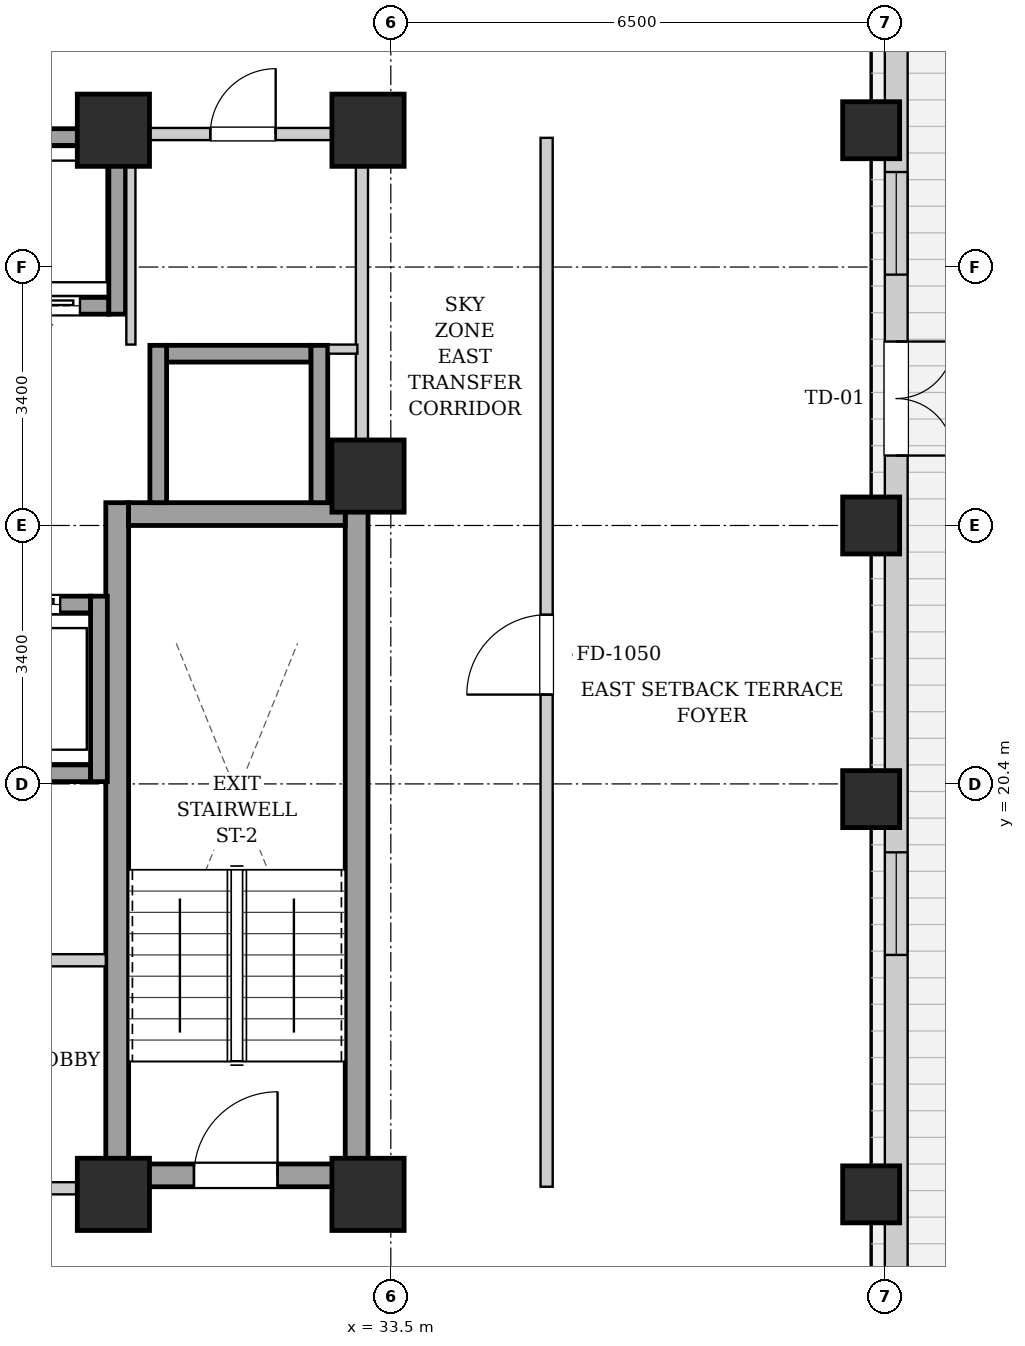
"""IFC4 building model, lengths in metres.
Left out: names, types, materials, properties, quantities, classifications, styles, units other than length and angle.
Written with IfcOpenShell. Run it as: python <this file> out.ifc"""

import sys

from ifc_helpers import new_model, si_unit, direction, frame, frame_2d, origin, origin_2d, place, context, subcontext, project, spatial, rectangle, extrude, element, fill, save


model = new_model("IFC4")
c1 = context("Model", 3, precision=1e-05, world=origin(), true_north=direction((0.0, 1.0)))
c2 = subcontext(c1, "Body", "Model", "MODEL_VIEW")
j1 = project(units=[si_unit("LENGTHUNIT", "METRE"), si_unit("PLANEANGLEUNIT", "RADIAN")], contexts=[c1])
p1 = place(None, origin())
s1 = spatial("IfcSite", under=j1, at=p1, CompositionType="ELEMENT")
p2 = place(p1, origin())
s2 = spatial("IfcBuilding", under=s1, at=p2, CompositionType="ELEMENT")
p3 = place(p2, frame((0.0, 0.0, 124.4)))
s3 = spatial("IfcBuildingStorey", under=s2, at=p3, CompositionType="ELEMENT", Elevation=124.4)
for number, where, z_axis, x_axis in (
    (1, (39.82, 15.0, 0.0), (0.0, 0.0, 1.0), (1.0, 0.0, 0.0)),
    (2, (39.82, 20.2, 0.0), (0.0, 0.0, 1.0), (1.0, 0.0, 0.0)),
    (3, (39.82, 23.8, 0.0), (0.0, 0.0, 1.0), (1.0, 0.0, 0.0)),
    (4, (39.82, 29.0, 0.0), (0.0, 0.0, 1.0), (1.0, 0.0, 0.0)),
):
    element("IfcColumn", number, at=place(p3, frame(where, z_axis=z_axis, x_axis=x_axis)), inside=s3, PredefinedType="COLUMN", context=c2, shape_type="SweptSolid", body=[
        extrude(rectangle(XDim=0.75, YDim=0.75, at=origin_2d()), origin(), (0.0, 0.0, 1.0), 3.25),
    ])
for number, where, z_axis, x_axis in (
    (5, (29.85, 15.0, 0.0), (0.0, 0.0, 1.0), (1.0, 0.0, 0.0)),
    (6, (33.2, 15.0, 0.0), (0.0, 0.0, 1.0), (1.0, 0.0, 0.0)),
    (7, (29.85, 29.0, 0.0), (0.0, 0.0, 1.0), (1.0, 0.0, 0.0)),
    (8, (33.2, 29.0, 0.0), (0.0, 0.0, 1.0), (1.0, 0.0, 0.0)),
    (9, (33.2, 24.45, 0.0), (0.0, 0.0, 1.0), (1.0, 0.0, 0.0)),
):
    element("IfcColumn", number, at=place(p3, frame(where, z_axis=z_axis, x_axis=x_axis)), inside=s3, PredefinedType="COLUMN", context=c2, shape_type="SweptSolid", body=[
        extrude(rectangle(XDim=0.95, YDim=0.95, at=origin_2d()), origin(), (0.0, 0.0, 1.0), 3.25),
    ])
p4 = place(p3, frame((40.15, 40.8, 0.0), z_axis=(0.0, 0.0, 1.0), x_axis=(0.0, -1.0, 0.0)))
e10 = element("IfcWall", 10, at=p4, inside=s3, PredefinedType="SOLIDWALL", context=c2, shape_type="SweptSolid", body=[
    extrude(rectangle(XDim=34.5, YDim=0.3, at=frame_2d((17.25, 0.0))), origin(), (0.0, 0.0, 1.0), 2.99),
])
p5 = place(p4, frame((14.58, 0.0, 0.0)))
e11 = element("IfcOpeningElement", 11, at=p5, cuts=e10, PredefinedType="OPENING", context=c2, shape_type="SweptSolid", body=[
    extrude(rectangle(XDim=1.5, YDim=1.982, at=frame_2d((0.75, 0.991))), frame((0.0, 0.16, 0.0), z_axis=(0.0, -1.0, 0.0), x_axis=(1.0, 0.0, 0.0)), (0.0, 0.0, 1.0), 0.32),
])
p6 = place(p4, frame((21.3, 0.0, 0.55)))
e12 = element("IfcOpeningElement", 12, at=p6, cuts=e10, PredefinedType="OPENING", context=c2, shape_type="SweptSolid", body=[
    extrude(rectangle(XDim=1.35, YDim=1.2, at=frame_2d((0.675, 0.6))), frame((0.0, 0.16, 0.0), z_axis=(0.0, -1.0, 0.0), x_axis=(1.0, 0.0, 0.0)), (0.0, 0.0, 1.0), 0.32),
])
p7 = place(p4, frame((12.35, 0.0, 0.55)))
e13 = element("IfcOpeningElement", 13, at=p7, cuts=e10, PredefinedType="OPENING", context=c2, shape_type="SweptSolid", body=[
    extrude(rectangle(XDim=1.35, YDim=1.2, at=frame_2d((0.675, 0.6))), frame((0.0, 0.16, 0.0), z_axis=(0.0, -1.0, 0.0), x_axis=(1.0, 0.0, 0.0)), (0.0, 0.0, 1.0), 0.32),
])
for number, where, z_axis, x_axis in (
    (14, (29.9, 15.1, 0.0), (0.0, 0.0, 1.0), (0.0, 1.0, 0.0)),
    (15, (33.05, 15.1, 0.0), (0.0, 0.0, 1.0), (0.0, 1.0, 0.0)),
):
    element("IfcWall", number, at=place(p3, frame(where, z_axis=z_axis, x_axis=x_axis)), inside=s3, PredefinedType="SHEAR", context=c2, shape_type="SweptSolid", body=[
        extrude(rectangle(XDim=9.0, YDim=0.3, at=frame_2d((4.5, 0.0))), origin(), (0.0, 0.0, 1.0), 2.99),
    ])
p8 = place(p3, frame((30.05, 23.95, 0.0), z_axis=(0.0, 0.0, 1.0), x_axis=(1.0, 0.0, 0.0)))
e16 = element("IfcWall", 16, at=p8, inside=s3, PredefinedType="SHEAR", context=c2, shape_type="SweptSolid", body=[
    extrude(rectangle(XDim=2.85, YDim=0.3, at=frame_2d((1.425, 0.0))), origin(), (0.0, 0.0, 1.0), 2.99),
])
p9 = place(p3, frame((30.05, 15.25, 0.0), z_axis=(0.0, 0.0, 1.0), x_axis=(1.0, 0.0, 0.0)))
e17 = element("IfcWall", 17, at=p9, inside=s3, PredefinedType="SHEAR", context=c2, shape_type="SweptSolid", body=[
    extrude(rectangle(XDim=2.85, YDim=0.3, at=frame_2d((1.425, 0.0))), origin(), (0.0, 0.0, 1.0), 2.99),
])
p10 = place(p9, frame((0.86, 0.0, 0.0)))
e18 = element("IfcOpeningElement", 18, at=p10, cuts=e17, PredefinedType="OPENING", context=c2, shape_type="SweptSolid", body=[
    extrude(rectangle(XDim=1.1, YDim=2.05, at=frame_2d((0.55, 1.025))), frame((0.0, 0.16, 0.0), z_axis=(0.0, -1.0, 0.0), x_axis=(1.0, 0.0, 0.0)), (0.0, 0.0, 1.0), 0.32),
])
p11 = place(p3, frame((27.93, 26.69, 0.0), z_axis=(0.0, 0.0, 1.0), x_axis=(1.0, 0.0, 0.0)))
e19 = element("IfcWall", 19, at=p11, inside=s3, PredefinedType="SHEAR", context=c2, shape_type="SweptSolid", body=[
    extrude(rectangle(XDim=1.86, YDim=0.22, at=frame_2d((0.93, 0.0))), origin(), (0.0, 0.0, 1.0), 2.99),
])
p12 = place(p11, frame((0.38, 0.0, 0.0)))
e20 = element("IfcOpeningElement", 20, at=p12, cuts=e19, PredefinedType="OPENING", context=c2, shape_type="SweptSolid", body=[
    extrude(rectangle(XDim=1.1, YDim=2.15, at=frame_2d((0.55, 1.075))), frame((0.0, 0.12, 0.0), z_axis=(0.0, -1.0, 0.0), x_axis=(1.0, 0.0, 0.0)), (0.0, 0.0, 1.0), 0.24),
])
p13 = place(p3, frame((27.93, 28.91, 0.0), z_axis=(0.0, 0.0, 1.0), x_axis=(1.0, 0.0, 0.0)))
e21 = element("IfcWall", 21, at=p13, inside=s3, PredefinedType="SHEAR", context=c2, shape_type="SweptSolid", body=[
    extrude(rectangle(XDim=1.86, YDim=0.22, at=frame_2d((0.93, 0.0))), origin(), (0.0, 0.0, 1.0), 2.99),
])
p14 = place(p3, frame((29.9, 26.58, 0.0), z_axis=(0.0, 0.0, 1.0), x_axis=(0.0, 1.0, 0.0)))
e22 = element("IfcWall", 22, at=p14, inside=s3, PredefinedType="SHEAR", context=c2, shape_type="SweptSolid", body=[
    extrude(rectangle(XDim=2.44, YDim=0.22, at=frame_2d((1.22, 0.0))), origin(), (0.0, 0.0, 1.0), 2.99),
])
p15 = place(p3, frame((27.65, 20.54, 0.0), z_axis=(0.0, 0.0, 1.0), x_axis=(1.0, 0.0, 0.0)))
e23 = element("IfcWall", 23, at=p15, inside=s3, PredefinedType="SHEAR", context=c2, shape_type="SweptSolid", body=[
    extrude(rectangle(XDim=1.9, YDim=0.22, at=frame_2d((0.95, 0.0))), origin(), (0.0, 0.0, 1.0), 2.99),
])
p16 = place(p3, frame((27.65, 22.76, 0.0), z_axis=(0.0, 0.0, 1.0), x_axis=(1.0, 0.0, 0.0)))
e24 = element("IfcWall", 24, at=p16, inside=s3, PredefinedType="SHEAR", context=c2, shape_type="SweptSolid", body=[
    extrude(rectangle(XDim=1.9, YDim=0.22, at=frame_2d((0.95, 0.0))), origin(), (0.0, 0.0, 1.0), 2.99),
])
p17 = place(p16, frame((0.4, 0.0, 0.0)))
e25 = element("IfcOpeningElement", 25, at=p17, cuts=e24, PredefinedType="OPENING", context=c2, shape_type="SweptSolid", body=[
    extrude(rectangle(XDim=1.1, YDim=2.15, at=frame_2d((0.55, 1.075))), frame((0.0, 0.12, 0.0), z_axis=(0.0, -1.0, 0.0), x_axis=(1.0, 0.0, 0.0)), (0.0, 0.0, 1.0), 0.24),
])
p18 = place(p3, frame((29.66, 20.43, 0.0), z_axis=(0.0, 0.0, 1.0), x_axis=(0.0, 1.0, 0.0)))
e26 = element("IfcWall", 26, at=p18, inside=s3, PredefinedType="SHEAR", context=c2, shape_type="SweptSolid", body=[
    extrude(rectangle(XDim=2.44, YDim=0.22, at=frame_2d((1.22, 0.0))), origin(), (0.0, 0.0, 1.0), 2.99),
])
p19 = place(p3, frame((30.55, 26.06, 0.0), z_axis=(0.0, 0.0, 1.0), x_axis=(1.0, 0.0, 0.0)))
e27 = element("IfcWall", 27, at=p19, inside=s3, PredefinedType="SHEAR", context=c2, shape_type="SweptSolid", body=[
    extrude(rectangle(XDim=1.9, YDim=0.22, at=frame_2d((0.95, 0.0))), origin(), (0.0, 0.0, 1.0), 2.99),
])
for number, where, z_axis, x_axis in (
    (28, (30.44, 24.1, 0.0), (0.0, 0.0, 1.0), (0.0, 1.0, 0.0)),
    (29, (32.56, 24.1, 0.0), (0.0, 0.0, 1.0), (0.0, 1.0, 0.0)),
):
    element("IfcWall", number, at=place(p3, frame(where, z_axis=z_axis, x_axis=x_axis)), inside=s3, PredefinedType="SHEAR", context=c2, shape_type="SweptSolid", body=[
        extrude(rectangle(XDim=2.07, YDim=0.22, at=frame_2d((1.035, 0.0))), origin(), (0.0, 0.0, 1.0), 2.99),
    ])
p20 = place(p3, frame((21.25, 15.08, 0.0), z_axis=(0.0, 0.0, 1.0), x_axis=(1.0, 0.0, 0.0)))
e30 = element("IfcWall", 30, at=p20, inside=s3, PredefinedType="PARTITIONING", context=c2, shape_type="SweptSolid", body=[
    extrude(rectangle(XDim=8.5, YDim=0.16, at=frame_2d((4.25, 0.0))), origin(), (0.0, 0.0, 1.0), 2.426),
])
p21 = place(p20, frame((3.725, 0.0, 0.0)))
e31 = element("IfcOpeningElement", 31, at=p21, cuts=e30, PredefinedType="OPENING", context=c2, shape_type="SweptSolid", body=[
    extrude(rectangle(XDim=1.05, YDim=2.05, at=frame_2d((0.525, 1.025))), frame((0.0, 0.09, 0.0), z_axis=(0.0, -1.0, 0.0), x_axis=(1.0, 0.0, 0.0)), (0.0, 0.0, 1.0), 0.18),
])
p22 = place(p3, frame((28.65, 18.08, 0.0), z_axis=(0.0, 0.0, 1.0), x_axis=(1.0, 0.0, 0.0)))
e32 = element("IfcWall", 32, at=p22, inside=s3, PredefinedType="PARTITIONING", context=c2, shape_type="SweptSolid", body=[
    extrude(rectangle(XDim=1.1, YDim=0.16, at=frame_2d((0.55, 0.0))), origin(), (0.0, 0.0, 1.0), 2.99),
])
p23 = place(p3, frame((33.12, 24.12, 0.0), z_axis=(0.0, 0.0, 1.0), x_axis=(0.0, 1.0, 0.0)))
e33 = element("IfcWall", 33, at=p23, inside=s3, PredefinedType="PARTITIONING", context=c2, shape_type="SweptSolid", body=[
    extrude(rectangle(XDim=4.76, YDim=0.16, at=frame_2d((2.38, 0.0))), origin(), (0.0, 0.0, 1.0), 2.99),
])
p24 = place(p3, frame((30.08, 26.18, 0.0), z_axis=(0.0, 0.0, 1.0), x_axis=(0.0, 1.0, 0.0)))
e34 = element("IfcWall", 34, at=p24, inside=s3, PredefinedType="PARTITIONING", context=c2, shape_type="SweptSolid", body=[
    extrude(rectangle(XDim=2.68, YDim=0.12, at=frame_2d((1.34, 0.0))), origin(), (0.0, 0.0, 1.0), 2.99),
])
p25 = place(p3, frame((32.68, 26.12, 0.0), z_axis=(0.0, 0.0, 1.0), x_axis=(1.0, 0.0, 0.0)))
e35 = element("IfcWall", 35, at=p25, inside=s3, PredefinedType="PARTITIONING", context=c2, shape_type="SweptSolid", body=[
    extrude(rectangle(XDim=0.38, YDim=0.12, at=frame_2d((0.19, 0.0))), origin(), (0.0, 0.0, 1.0), 2.99),
])
p26 = place(p3, frame((30.08, 28.95, 0.0), z_axis=(0.0, 0.0, 1.0), x_axis=(1.0, 0.0, 0.0)))
e36 = element("IfcWall", 36, at=p26, inside=s3, PredefinedType="PARTITIONING", context=c2, shape_type="SweptSolid", body=[
    extrude(rectangle(XDim=2.96, YDim=0.16, at=frame_2d((1.48, 0.0))), origin(), (0.0, 0.0, 1.0), 2.99),
])
p27 = place(p26, frame((1.045, 0.0, 0.0)))
e37 = element("IfcOpeningElement", 37, at=p27, cuts=e36, PredefinedType="OPENING", context=c2, shape_type="SweptSolid", body=[
    extrude(rectangle(XDim=0.86, YDim=2.05, at=frame_2d((0.43, 1.025))), frame((0.0, 0.09, 0.0), z_axis=(0.0, -1.0, 0.0), x_axis=(1.0, 0.0, 0.0)), (0.0, 0.0, 1.0), 0.18),
])
p28 = place(p3, frame((35.55, 15.1, 0.0), z_axis=(0.0, 0.0, 1.0), x_axis=(0.0, 1.0, 0.0)))
e38 = element("IfcWall", 38, at=p28, inside=s3, PredefinedType="PARTITIONING", context=c2, shape_type="SweptSolid", body=[
    extrude(rectangle(XDim=13.8, YDim=0.16, at=frame_2d((6.9, 0.0))), origin(), (0.0, 0.0, 1.0), 2.99),
])
p29 = place(p28, frame((6.475, 0.0, 0.0)))
e39 = element("IfcOpeningElement", 39, at=p29, cuts=e38, PredefinedType="OPENING", context=c2, shape_type="SweptSolid", body=[
    extrude(rectangle(XDim=1.05, YDim=2.05, at=frame_2d((0.525, 1.025))), frame((0.0, 0.09, 0.0), z_axis=(0.0, -1.0, 0.0), x_axis=(1.0, 0.0, 0.0)), (0.0, 0.0, 1.0), 0.18),
])
p30 = place(p10, origin())
e40 = element("IfcDoor", 40, at=p30, inside=s3, OperationType="SINGLE_SWING_RIGHT", PredefinedType="DOOR", context=c2, shape_type="SweptSolid", body=[
    extrude(rectangle(XDim=1.1, YDim=2.05, at=frame_2d((0.55, 1.025))), frame((0.0, 0.025, 0.0), z_axis=(0.0, -1.0, 0.0), x_axis=(1.0, 0.0, 0.0)), (0.0, 0.0, 1.0), 0.05),
])
fill(e18, e40)
p31 = place(p12, origin())
e41 = element("IfcDoor", 41, at=p31, inside=s3, OperationType="SLIDING_TO_LEFT", PredefinedType="DOOR", context=c2, shape_type="SweptSolid", body=[
    extrude(rectangle(XDim=1.1, YDim=2.15, at=frame_2d((0.55, 1.075))), frame((0.0, 0.025, 0.0), z_axis=(0.0, -1.0, 0.0), x_axis=(1.0, 0.0, 0.0)), (0.0, 0.0, 1.0), 0.05),
])
fill(e20, e41)
p32 = place(p17, origin())
e42 = element("IfcDoor", 42, at=p32, inside=s3, OperationType="SLIDING_TO_LEFT", PredefinedType="DOOR", context=c2, shape_type="SweptSolid", body=[
    extrude(rectangle(XDim=1.1, YDim=2.15, at=frame_2d((0.55, 1.075))), frame((0.0, 0.025, 0.0), z_axis=(0.0, -1.0, 0.0), x_axis=(1.0, 0.0, 0.0)), (0.0, 0.0, 1.0), 0.05),
])
fill(e25, e42)
p33 = place(p27, origin())
e43 = element("IfcDoor", 43, at=p33, inside=s3, OperationType="SINGLE_SWING_RIGHT", PredefinedType="DOOR", context=c2, shape_type="SweptSolid", body=[
    extrude(rectangle(XDim=0.86, YDim=2.05, at=frame_2d((0.43, 1.025))), frame((0.0, 0.025, 0.0), z_axis=(0.0, -1.0, 0.0), x_axis=(1.0, 0.0, 0.0)), (0.0, 0.0, 1.0), 0.05),
])
fill(e37, e43)
p34 = place(p29, origin())
e44 = element("IfcDoor", 44, at=p34, inside=s3, OperationType="SINGLE_SWING_LEFT", PredefinedType="DOOR", context=c2, shape_type="SweptSolid", body=[
    extrude(rectangle(XDim=1.05, YDim=2.05, at=frame_2d((0.525, 1.025))), frame((0.0, 0.025, 0.0), z_axis=(0.0, -1.0, 0.0), x_axis=(1.0, 0.0, 0.0)), (0.0, 0.0, 1.0), 0.05),
])
fill(e39, e44)
p35 = place(p5, origin())
e45 = element("IfcDoor", 45, at=p35, inside=s3, OperationType="DOUBLE_SWING_LEFT", PredefinedType="DOOR", context=c2, shape_type="SweptSolid", body=[
    extrude(rectangle(XDim=1.5, YDim=1.982, at=frame_2d((0.75, 0.991))), frame((0.0, 0.025, 0.0), z_axis=(0.0, -1.0, 0.0), x_axis=(1.0, 0.0, 0.0)), (0.0, 0.0, 1.0), 0.05),
])
fill(e11, e45)
p36 = place(p6, origin())
e46 = element("IfcWindow", 46, at=p36, inside=s3, PartitioningType="SINGLE_PANEL", PredefinedType="WINDOW", context=c2, shape_type="SweptSolid", body=[
    extrude(rectangle(XDim=1.35, YDim=1.2, at=frame_2d((0.675, 0.6))), frame((0.0, 0.03, 0.0), z_axis=(0.0, -1.0, 0.0), x_axis=(1.0, 0.0, 0.0)), (0.0, 0.0, 1.0), 0.06),
])
fill(e12, e46)
p37 = place(p7, origin())
e47 = element("IfcWindow", 47, at=p37, inside=s3, PartitioningType="SINGLE_PANEL", PredefinedType="WINDOW", context=c2, shape_type="SweptSolid", body=[
    extrude(rectangle(XDim=1.35, YDim=1.2, at=frame_2d((0.675, 0.6))), frame((0.0, 0.03, 0.0), z_axis=(0.0, -1.0, 0.0), x_axis=(1.0, 0.0, 0.0)), (0.0, 0.0, 1.0), 0.06),
])
fill(e13, e47)
save(model, sys.argv[1])
